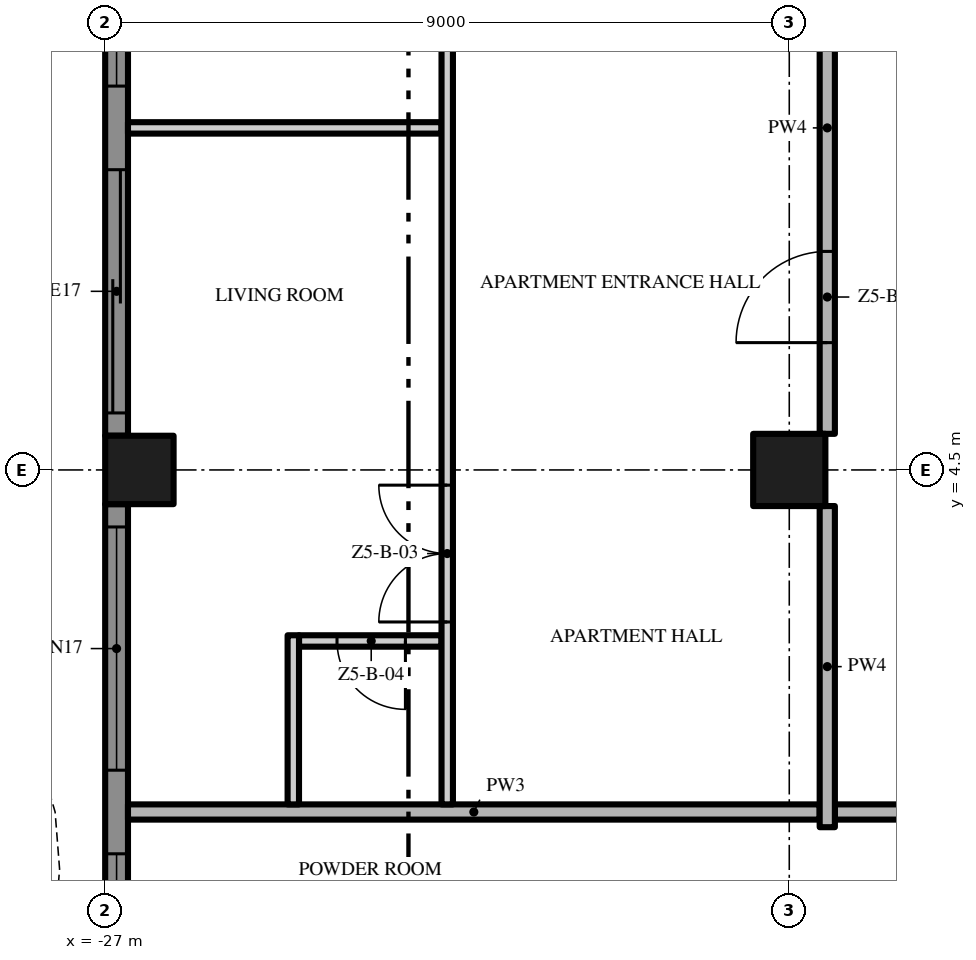
"""IFC4 building model, lengths in metres.
Left out: names, types, materials, properties, quantities, classifications, styles, units other than length and angle.
Written with IfcOpenShell. Run it as: python <this file> out.ifc"""

import sys

from ifc_helpers import new_model, si_unit, direction, frame, frame_2d, origin, origin_2d, place, context, subcontext, project, spatial, polyline, rectangle, outline, extrude, element, fill, save


model = new_model("IFC4")
c1 = context("Model", 3, precision=1e-05, world=origin(), true_north=direction((0.0, 1.0)))
c2 = subcontext(c1, "Body", "Model", "MODEL_VIEW")
j1 = project(units=[si_unit("LENGTHUNIT", "METRE"), si_unit("PLANEANGLEUNIT", "RADIAN")], contexts=[c1])
p1 = place(None, origin())
s1 = spatial("IfcSite", under=j1, at=p1, CompositionType="ELEMENT")
p2 = place(p1, origin())
s2 = spatial("IfcBuilding", under=s1, at=p2, CompositionType="ELEMENT")
p3 = place(p2, frame((0.0, 0.0, 257.8)))
s3 = spatial("IfcBuildingStorey", under=s2, at=p3, CompositionType="ELEMENT", Elevation=257.8)
p4 = place(p3, frame((-18.0, 4.5, 0.0), z_axis=(0.0, 0.0, 1.0), x_axis=(1.0, 0.0, 0.0)))
e1 = element("IfcColumn", 1, at=p4, inside=s3, PredefinedType="COLUMN", context=c2, shape_type="SweptSolid", body=[
    extrude(rectangle(XDim=0.95, YDim=0.95, at=origin_2d()), origin(), (0.0, 0.0, 1.0), 3.5),
])
p5 = place(p3, frame((-26.55, 4.5, 0.0), z_axis=(0.0, 0.0, 1.0), x_axis=(1.0, 0.0, 0.0)))
e2 = element("IfcColumn", 2, at=p5, inside=s3, PredefinedType="COLUMN", context=c2, shape_type="SweptSolid", body=[
    extrude(rectangle(XDim=0.9, YDim=0.9, at=origin_2d()), origin(), (0.0, 0.0, 1.0), 3.5),
])
p6 = place(p3, frame((-26.85, 4.95, 0.0), z_axis=(0.0, 0.0, 1.0), x_axis=(0.0, 1.0, 0.0)))
e3 = element("IfcWall", 3, at=p6, inside=s3, PredefinedType="SOLIDWALL", context=c2, shape_type="SweptSolid", body=[
    extrude(rectangle(XDim=8.1, YDim=0.3, at=frame_2d((4.05, 0.0))), origin(), (0.0, 0.0, 1.0), 3.5),
])
p7 = place(p6, frame((4.6, 0.0, 0.45)))
e4 = element("IfcOpeningElement", 4, at=p7, cuts=e3, PredefinedType="OPENING", context=c2, shape_type="SweptSolid", body=[
    extrude(rectangle(XDim=3.2, YDim=2.65, at=frame_2d((1.6, 1.325))), frame((0.0, 0.16, 0.0), z_axis=(0.0, -1.0, 0.0), x_axis=(1.0, 0.0, 0.0)), (0.0, 0.0, 1.0), 0.32),
])
p8 = place(p6, frame((0.3, 0.0, 0.0)))
e5 = element("IfcOpeningElement", 5, at=p8, cuts=e3, PredefinedType="OPENING", context=c2, shape_type="SweptSolid", body=[
    extrude(rectangle(XDim=3.2, YDim=2.4, at=frame_2d((1.6, 1.2))), frame((0.0, 0.16, 0.0), z_axis=(0.0, -1.0, 0.0), x_axis=(1.0, 0.0, 0.0)), (0.0, 0.0, 1.0), 0.32),
])
p9 = place(p3, frame((-26.85, -4.05, 0.0), z_axis=(0.0, 0.0, 1.0), x_axis=(0.0, 1.0, 0.0)))
e6 = element("IfcWall", 6, at=p9, inside=s3, PredefinedType="SOLIDWALL", context=c2, shape_type="SweptSolid", body=[
    extrude(rectangle(XDim=8.1, YDim=0.3, at=frame_2d((4.05, 0.0))), origin(), (0.0, 0.0, 1.0), 3.5),
])
p10 = place(p9, frame((4.6, 0.0, 0.45)))
e7 = element("IfcOpeningElement", 7, at=p10, cuts=e6, PredefinedType="OPENING", context=c2, shape_type="SweptSolid", body=[
    extrude(rectangle(XDim=3.2, YDim=2.65, at=frame_2d((1.6, 1.325))), frame((0.0, 0.16, 0.0), z_axis=(0.0, -1.0, 0.0), x_axis=(1.0, 0.0, 0.0)), (0.0, 0.0, 1.0), 0.32),
])
p11 = place(p9, frame((0.3, 0.0, 0.45)))
e8 = element("IfcOpeningElement", 8, at=p11, cuts=e6, PredefinedType="OPENING", context=c2, shape_type="SweptSolid", body=[
    extrude(rectangle(XDim=3.2, YDim=2.65, at=frame_2d((1.6, 1.325))), frame((0.0, 0.16, 0.0), z_axis=(0.0, -1.0, 0.0), x_axis=(1.0, 0.0, 0.0)), (0.0, 0.0, 1.0), 0.32),
])
p12 = place(p3, origin())
e9 = element("IfcWall", 9, at=p12, inside=s3, PredefinedType="USERDEFINED", context=c2, shape_type="SweptSolid", body=[
    extrude(outline(polyline([(-28.8, 18.0), (-28.095, 16.5), (-27.659, 15.0), (-27.6, 14.25), (-27.659, 13.5), (-28.095, 12.0), (-28.8, 10.5), (-29.505, 9.0), (-29.941, 7.5), (-30.0, 6.75), (-29.941, 6.0), (-29.505, 4.5), (-28.8, 3.0), (-28.095, 1.5), (-27.659, 0.0), (-27.6, -0.75), (-27.659, -1.5), (-28.095, -3.0), (-28.8, -4.5), (-29.505, -6.0), (-29.941, -7.5), (-30.0, -8.25), (-29.941, -9.0), (-29.505, -10.5), (-28.8, -12.0), (-28.095, -13.5), (-27.659, -15.0), (-27.6, -15.75), (-27.659, -16.5), (-28.095, -18.0), (-27.855, -18.07), (-27.411, -16.545), (-27.349, -15.75), (-27.411, -14.955), (-27.86, -13.411), (-28.574, -11.894), (-29.271, -10.411), (-29.694, -8.955), (-29.749, -8.25), (-29.694, -7.545), (-29.271, -6.089), (-28.574, -4.606), (-27.86, -3.089), (-27.411, -1.545), (-27.349, -0.75), (-27.411, 0.045), (-27.86, 1.589), (-28.574, 3.106), (-29.271, 4.589), (-29.694, 6.045), (-29.749, 6.75), (-29.694, 7.455), (-29.271, 8.911), (-28.574, 10.394), (-27.86, 11.911), (-27.411, 13.455), (-27.349, 14.25), (-27.411, 15.045), (-27.86, 16.589), (-28.574, 18.106), (-28.8, 18.0)])), origin(), (0.0, 0.0, 1.0), 0.9),
])
p13 = place(p3, frame((17.4, 0.0, 0.0), z_axis=(0.0, 0.0, 1.0), x_axis=(-1.0, 0.0, 0.0)))
e10 = element("IfcWall", 10, at=p13, inside=s3, PredefinedType="PARTITIONING", context=c2, shape_type="SweptSolid", body=[
    extrude(rectangle(XDim=34.8, YDim=0.2, at=frame_2d((17.4, 0.0))), origin(), (0.0, 0.0, 1.0), 3.5),
])
p14 = place(p13, frame((23.4, 0.0, 0.0)))
e11 = element("IfcOpeningElement", 11, at=p14, cuts=e10, PredefinedType="OPENING", context=c2, shape_type="SweptSolid", body=[
    extrude(rectangle(XDim=1.5, YDim=2.4, at=frame_2d((0.75, 1.2))), frame((0.0, 0.11, 0.0), z_axis=(0.0, -1.0, 0.0), x_axis=(1.0, 0.0, 0.0)), (0.0, 0.0, 1.0), 0.22),
])
p15 = place(p13, frame((5.4, 0.0, 0.0)))
e12 = element("IfcOpeningElement", 12, at=p15, cuts=e10, PredefinedType="OPENING", context=c2, shape_type="SweptSolid", body=[
    extrude(rectangle(XDim=1.5, YDim=2.4, at=frame_2d((0.75, 1.2))), frame((0.0, 0.11, 0.0), z_axis=(0.0, -1.0, 0.0), x_axis=(1.0, 0.0, 0.0)), (0.0, 0.0, 1.0), 0.22),
])
p16 = place(p3, frame((-26.7, 0.0, 0.0), z_axis=(0.0, 0.0, 1.0), x_axis=(1.0, 0.0, 0.0)))
e13 = element("IfcWall", 13, at=p16, inside=s3, PredefinedType="PARTITIONING", context=c2, shape_type="SweptSolid", body=[
    extrude(rectangle(XDim=9.1, YDim=0.2, at=frame_2d((4.55, 0.0))), origin(), (0.0, 0.0, 1.0), 3.5),
])
p17 = place(p3, frame((-22.575, 2.25, 0.0), z_axis=(0.0, 0.0, 1.0), x_axis=(-1.0, 0.0, 0.0)))
e14 = element("IfcWall", 14, at=p17, inside=s3, PredefinedType="PARTITIONING", context=c2, shape_type="SweptSolid", body=[
    extrude(rectangle(XDim=1.875, YDim=0.15, at=frame_2d((0.938, 0.0))), origin(), (0.0, 0.0, 1.0), 3.5),
])
p18 = place(p17, frame((0.475, 0.0, 0.0)))
e15 = element("IfcOpeningElement", 15, at=p18, cuts=e14, PredefinedType="OPENING", context=c2, shape_type="SweptSolid", body=[
    extrude(rectangle(XDim=0.9, YDim=2.1, at=frame_2d((0.45, 1.05))), frame((0.0, 0.085, 0.0), z_axis=(0.0, -1.0, 0.0), x_axis=(1.0, 0.0, 0.0)), (0.0, 0.0, 1.0), 0.17),
])
p19 = place(p3, frame((-26.7, 9.0, 0.0), z_axis=(0.0, 0.0, 1.0), x_axis=(1.0, 0.0, 0.0)))
e16 = element("IfcWall", 16, at=p19, inside=s3, PredefinedType="PARTITIONING", context=c2, shape_type="SweptSolid", body=[
    extrude(rectangle(XDim=4.125, YDim=0.15, at=frame_2d((2.062, 0.0))), origin(), (0.0, 0.0, 1.0), 3.5),
])
p20 = place(p3, frame((-24.525, 0.1, 0.0), z_axis=(0.0, 0.0, 1.0), x_axis=(0.0, 1.0, 0.0)))
e17 = element("IfcWall", 17, at=p20, inside=s3, PredefinedType="PARTITIONING", context=c2, shape_type="SweptSolid", body=[
    extrude(rectangle(XDim=2.225, YDim=0.15, at=frame_2d((1.113, 0.0))), origin(), (0.0, 0.0, 1.0), 3.5),
])
p21 = place(p3, frame((-22.5, 0.1, 0.0), z_axis=(0.0, 0.0, 1.0), x_axis=(0.0, 1.0, 0.0)))
e18 = element("IfcWall", 18, at=p21, inside=s3, PredefinedType="PARTITIONING", context=c2, shape_type="SweptSolid", body=[
    extrude(rectangle(XDim=17.45, YDim=0.15, at=frame_2d((8.725, 0.0))), origin(), (0.0, 0.0, 1.0), 3.5),
])
p22 = place(p21, frame((2.4, 0.0, 0.0)))
e19 = element("IfcOpeningElement", 19, at=p22, cuts=e18, PredefinedType="OPENING", context=c2, shape_type="SweptSolid", body=[
    extrude(rectangle(XDim=1.8, YDim=2.4, at=frame_2d((0.9, 1.2))), frame((0.0, 0.085, 0.0), z_axis=(0.0, -1.0, 0.0), x_axis=(1.0, 0.0, 0.0)), (0.0, 0.0, 1.0), 0.17),
])
p23 = place(p21, frame((10.65, 0.0, 0.0)))
e20 = element("IfcOpeningElement", 20, at=p23, cuts=e18, PredefinedType="OPENING", context=c2, shape_type="SweptSolid", body=[
    extrude(rectangle(XDim=1.0, YDim=2.4, at=frame_2d((0.5, 1.2))), frame((0.0, 0.085, 0.0), z_axis=(0.0, -1.0, 0.0), x_axis=(1.0, 0.0, 0.0)), (0.0, 0.0, 1.0), 0.17),
])
p24 = place(p3, frame((-17.5, -0.2, 0.0), z_axis=(0.0, 0.0, 1.0), x_axis=(0.0, 1.0, 0.0)))
e21 = element("IfcWall", 21, at=p24, inside=s3, PredefinedType="PARTITIONING", context=c2, shape_type="SweptSolid", body=[
    extrude(rectangle(XDim=4.225, YDim=0.2, at=frame_2d((2.112, 0.0))), origin(), (0.0, 0.0, 1.0), 3.5),
])
p25 = place(p3, frame((-17.5, 4.975, 0.0), z_axis=(0.0, 0.0, 1.0), x_axis=(0.0, 1.0, 0.0)))
e22 = element("IfcWall", 22, at=p25, inside=s3, PredefinedType="PARTITIONING", context=c2, shape_type="SweptSolid", body=[
    extrude(rectangle(XDim=8.05, YDim=0.2, at=frame_2d((4.025, 0.0))), origin(), (0.0, 0.0, 1.0), 3.5),
])
p26 = place(p25, frame((1.2, 0.0, 0.0)))
e23 = element("IfcOpeningElement", 23, at=p26, cuts=e22, PredefinedType="OPENING", context=c2, shape_type="SweptSolid", body=[
    extrude(rectangle(XDim=1.2, YDim=2.4, at=frame_2d((0.6, 1.2))), frame((0.0, 0.11, 0.0), z_axis=(0.0, -1.0, 0.0), x_axis=(1.0, 0.0, 0.0)), (0.0, 0.0, 1.0), 0.22),
])
p27 = place(p7, origin())
e24 = element("IfcWindow", 24, at=p27, inside=s3, PartitioningType="SINGLE_PANEL", PredefinedType="WINDOW", context=c2, shape_type="SweptSolid", body=[
    extrude(rectangle(XDim=3.2, YDim=2.65, at=frame_2d((1.6, 1.325))), frame((0.0, 0.03, 0.0), z_axis=(0.0, -1.0, 0.0), x_axis=(1.0, 0.0, 0.0)), (0.0, 0.0, 1.0), 0.06),
])
fill(e4, e24)
p28 = place(p8, origin())
e25 = element("IfcDoor", 25, at=p28, inside=s3, OperationType="SINGLE_SWING_LEFT", PredefinedType="DOOR", context=c2, shape_type="SweptSolid", body=[
    extrude(rectangle(XDim=3.2, YDim=2.4, at=frame_2d((1.6, 1.2))), frame((0.0, 0.025, 0.0), z_axis=(0.0, -1.0, 0.0), x_axis=(1.0, 0.0, 0.0)), (0.0, 0.0, 1.0), 0.05),
])
fill(e5, e25)
p29 = place(p10, origin())
e26 = element("IfcWindow", 26, at=p29, inside=s3, PartitioningType="SINGLE_PANEL", PredefinedType="WINDOW", context=c2, shape_type="SweptSolid", body=[
    extrude(rectangle(XDim=3.2, YDim=2.65, at=frame_2d((1.6, 1.325))), frame((0.0, 0.03, 0.0), z_axis=(0.0, -1.0, 0.0), x_axis=(1.0, 0.0, 0.0)), (0.0, 0.0, 1.0), 0.06),
])
fill(e7, e26)
p30 = place(p11, origin())
e27 = element("IfcWindow", 27, at=p30, inside=s3, PartitioningType="SINGLE_PANEL", PredefinedType="WINDOW", context=c2, shape_type="SweptSolid", body=[
    extrude(rectangle(XDim=3.2, YDim=2.65, at=frame_2d((1.6, 1.325))), frame((0.0, 0.03, 0.0), z_axis=(0.0, -1.0, 0.0), x_axis=(1.0, 0.0, 0.0)), (0.0, 0.0, 1.0), 0.06),
])
fill(e8, e27)
p31 = place(p26, origin())
e28 = element("IfcDoor", 28, at=p31, inside=s3, OperationType="SINGLE_SWING_LEFT", PredefinedType="DOOR", context=c2, shape_type="SweptSolid", body=[
    extrude(rectangle(XDim=1.2, YDim=2.4, at=frame_2d((0.6, 1.2))), frame((0.0, 0.025, 0.0), z_axis=(0.0, -1.0, 0.0), x_axis=(1.0, 0.0, 0.0)), (0.0, 0.0, 1.0), 0.05),
])
fill(e23, e28)
p32 = place(p22, origin())
e29 = element("IfcDoor", 29, at=p32, inside=s3, OperationType="DOUBLE_DOOR_SINGLE_SWING", PredefinedType="DOOR", context=c2, shape_type="SweptSolid", body=[
    extrude(rectangle(XDim=1.8, YDim=2.4, at=frame_2d((0.9, 1.2))), frame((0.0, 0.025, 0.0), z_axis=(0.0, -1.0, 0.0), x_axis=(1.0, 0.0, 0.0)), (0.0, 0.0, 1.0), 0.05),
])
fill(e19, e29)
p33 = place(p18, origin())
e30 = element("IfcDoor", 30, at=p33, inside=s3, OperationType="SINGLE_SWING_LEFT", PredefinedType="DOOR", context=c2, shape_type="SweptSolid", body=[
    extrude(rectangle(XDim=0.9, YDim=2.1, at=frame_2d((0.45, 1.05))), frame((0.0, 0.025, 0.0), z_axis=(0.0, -1.0, 0.0), x_axis=(1.0, 0.0, 0.0)), (0.0, 0.0, 1.0), 0.05),
])
fill(e15, e30)
save(model, sys.argv[1])
